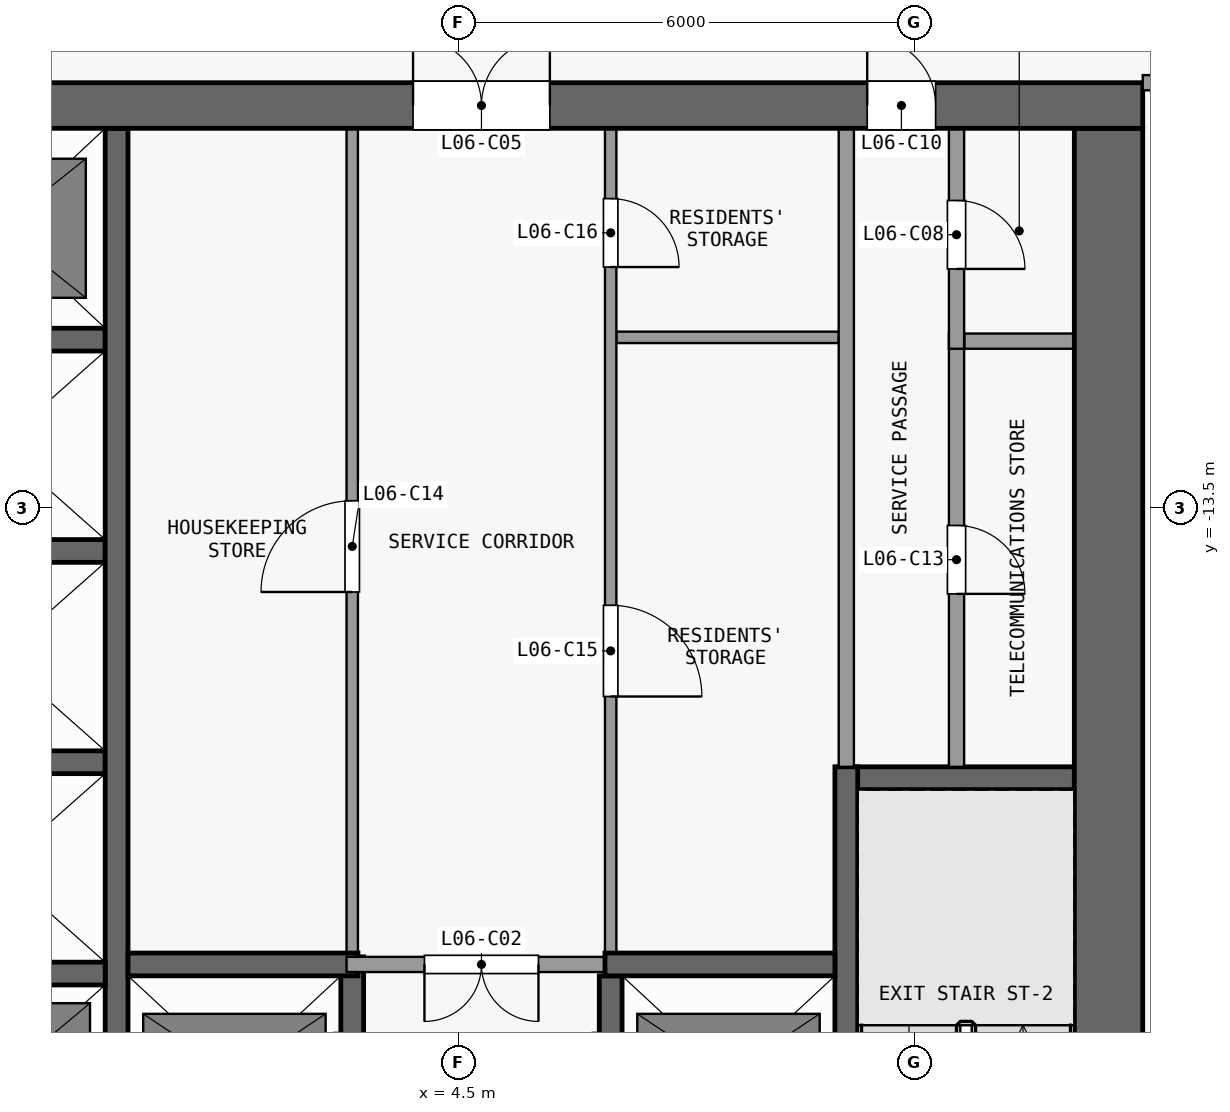
"""IFC4 building model, lengths in metres.
Left out: names, types, materials, properties, quantities, classifications, styles, units other than length and angle.
Written with IfcOpenShell. Run it as: python <this file> out.ifc"""

import sys

from ifc_helpers import new_model, si_unit, direction, frame, frame_2d, origin, place, context, subcontext, project, spatial, rectangle, extrude, element, fill, save


model = new_model("IFC4")
c1 = context("Model", 3, precision=1e-05, world=origin(), true_north=direction((0.0, 1.0)))
c2 = subcontext(c1, "Body", "Model", "MODEL_VIEW")
j1 = project(units=[si_unit("LENGTHUNIT", "METRE"), si_unit("PLANEANGLEUNIT", "RADIAN")], contexts=[c1])
p1 = place(None, origin())
s1 = spatial("IfcSite", under=j1, at=p1, CompositionType="ELEMENT")
p2 = place(p1, origin())
s2 = spatial("IfcBuilding", under=s1, at=p2, CompositionType="ELEMENT")
p3 = place(p2, frame((0.0, 0.0, 32.5)))
s3 = spatial("IfcBuildingStorey", under=s2, at=p3, CompositionType="ELEMENT", Elevation=32.5)
p4 = place(p3, frame((-13.5, -8.2, 0.0), z_axis=(0.0, 0.0, 1.0), x_axis=(1.0, 0.0, 0.0)))
e1 = element("IfcWall", 1, at=p4, inside=s3, PredefinedType="SHEAR", context=c2, shape_type="SweptSolid", body=[
    extrude(rectangle(XDim=27.0, YDim=0.6, at=frame_2d((13.5, 0.0))), origin(), (0.0, 0.0, 1.0), 3.3),
])
p5 = place(p4, frame((7.8, 0.0, 0.0)))
e2 = element("IfcOpeningElement", 2, at=p5, cuts=e1, PredefinedType="OPENING", context=c2, shape_type="SweptSolid", body=[
    extrude(rectangle(XDim=1.8, YDim=2.1, at=frame_2d((0.9, 1.05))), frame((0.0, 0.31, 0.0), z_axis=(0.0, -1.0, 0.0), x_axis=(1.0, 0.0, 0.0)), (0.0, 0.0, 1.0), 0.62),
])
p6 = place(p4, frame((17.4, 0.0, 0.0)))
e3 = element("IfcOpeningElement", 3, at=p6, cuts=e1, PredefinedType="OPENING", context=c2, shape_type="SweptSolid", body=[
    extrude(rectangle(XDim=1.8, YDim=2.1, at=frame_2d((0.9, 1.05))), frame((0.0, 0.31, 0.0), z_axis=(0.0, -1.0, 0.0), x_axis=(1.0, 0.0, 0.0)), (0.0, 0.0, 1.0), 0.62),
])
p7 = place(p4, frame((2.725, 0.0, 0.0)))
e4 = element("IfcOpeningElement", 4, at=p7, cuts=e1, PredefinedType="OPENING", context=c2, shape_type="SweptSolid", body=[
    extrude(rectangle(XDim=0.9, YDim=2.1, at=frame_2d((0.45, 1.05))), frame((0.0, 0.31, 0.0), z_axis=(0.0, -1.0, 0.0), x_axis=(1.0, 0.0, 0.0)), (0.0, 0.0, 1.0), 0.62),
])
p8 = place(p4, frame((23.375, 0.0, 0.0)))
e5 = element("IfcOpeningElement", 5, at=p8, cuts=e1, PredefinedType="OPENING", context=c2, shape_type="SweptSolid", body=[
    extrude(rectangle(XDim=0.9, YDim=2.1, at=frame_2d((0.45, 1.05))), frame((0.0, 0.31, 0.0), z_axis=(0.0, -1.0, 0.0), x_axis=(1.0, 0.0, 0.0)), (0.0, 0.0, 1.0), 0.62),
])
p9 = place(p3, frame((13.05, -24.6, 0.0), z_axis=(0.0, 0.0, 1.0), x_axis=(0.0, 1.0, 0.0)))
e6 = element("IfcWall", 6, at=p9, inside=s3, PredefinedType="SHEAR", context=c2, shape_type="SweptSolid", body=[
    extrude(rectangle(XDim=16.1, YDim=0.9, at=frame_2d((8.05, 0.0))), origin(), (0.0, 0.0, 1.0), 3.3),
])
p10 = place(p3, frame((-2.95, -19.62, 0.0), z_axis=(0.0, 0.0, 1.0), x_axis=(1.0, 0.0, 0.0)))
e7 = element("IfcWall", 7, at=p10, inside=s3, PredefinedType="SHEAR", context=c2, shape_type="SweptSolid", body=[
    extrude(rectangle(XDim=2.8, YDim=0.3, at=frame_2d((1.4, 0.0))), origin(), (0.0, 0.0, 1.0), 3.3),
])
p11 = place(p3, frame((0.15, -19.5, 0.0), z_axis=(0.0, 0.0, 1.0), x_axis=(1.0, 0.0, 0.0)))
e8 = element("IfcWall", 8, at=p11, inside=s3, PredefinedType="SHEAR", context=c2, shape_type="SweptSolid", body=[
    extrude(rectangle(XDim=3.025, YDim=0.3, at=frame_2d((1.513, 0.0))), origin(), (0.0, 0.0, 1.0), 3.3),
])
p12 = place(p3, frame((6.575, -19.5, 0.0), z_axis=(0.0, 0.0, 1.0), x_axis=(-1.0, 0.0, 0.0)))
e9 = element("IfcWall", 9, at=p12, inside=s3, PredefinedType="PARTITIONING", context=c2, shape_type="SweptSolid", body=[
    extrude(rectangle(XDim=3.55, YDim=0.2, at=frame_2d((1.775, 0.0))), origin(), (0.0, 0.0, 1.0), 3.3),
])
p13 = place(p12, frame((1.025, 0.0, 0.0)))
e10 = element("IfcOpeningElement", 10, at=p13, cuts=e9, PredefinedType="OPENING", context=c2, shape_type="SweptSolid", body=[
    extrude(rectangle(XDim=1.5, YDim=2.1, at=frame_2d((0.75, 1.05))), frame((0.0, 0.11, 0.0), z_axis=(0.0, -1.0, 0.0), x_axis=(1.0, 0.0, 0.0)), (0.0, 0.0, 1.0), 0.22),
])
p14 = place(p3, frame((6.425, -19.5, 0.0), z_axis=(0.0, 0.0, 1.0), x_axis=(1.0, 0.0, 0.0)))
e11 = element("IfcWall", 11, at=p14, inside=s3, PredefinedType="SHEAR", context=c2, shape_type="SweptSolid", body=[
    extrude(rectangle(XDim=3.025, YDim=0.3, at=frame_2d((1.512, 0.0))), origin(), (0.0, 0.0, 1.0), 3.3),
])
p15 = place(p3, frame((9.5, -17.05, 0.0), z_axis=(0.0, 0.0, 1.0), x_axis=(1.0, 0.0, 0.0)))
e12 = element("IfcWall", 12, at=p15, inside=s3, PredefinedType="SHEAR", context=c2, shape_type="SweptSolid", body=[
    extrude(rectangle(XDim=3.1, YDim=0.3, at=frame_2d((1.55, 0.0))), origin(), (0.0, 0.0, 1.0), 3.3),
])
for number, where, z_axis, x_axis in (
    (13, (-2.95, -16.84, 0.0), (0.0, 0.0, 1.0), (1.0, 0.0, 0.0)),
    (14, (-2.95, -14.06, 0.0), (0.0, 0.0, 1.0), (1.0, 0.0, 0.0)),
):
    element("IfcWall", number, at=place(p3, frame(where, z_axis=z_axis, x_axis=x_axis)), inside=s3, PredefinedType="SHEAR", context=c2, shape_type="SweptSolid", body=[
        extrude(rectangle(XDim=2.8, YDim=0.3, at=frame_2d((1.4, 0.0))), origin(), (0.0, 0.0, 1.0), 3.3),
    ])
p16 = place(p3, frame((11.15, -11.3, 0.0), z_axis=(0.0, 0.0, 1.0), x_axis=(1.0, 0.0, 0.0)))
e15 = element("IfcWall", 15, at=p16, inside=s3, PredefinedType="PARTITIONING", context=c2, shape_type="SweptSolid", body=[
    extrude(rectangle(XDim=1.45, YDim=0.2, at=frame_2d((0.725, 0.0))), origin(), (0.0, 0.0, 1.0), 3.3),
])
p17 = place(p3, frame((-2.95, -11.28, 0.0), z_axis=(0.0, 0.0, 1.0), x_axis=(1.0, 0.0, 0.0)))
e16 = element("IfcWall", 16, at=p17, inside=s3, PredefinedType="SHEAR", context=c2, shape_type="SweptSolid", body=[
    extrude(rectangle(XDim=2.8, YDim=0.3, at=frame_2d((1.4, 0.0))), origin(), (0.0, 0.0, 1.0), 3.3),
])
p18 = place(p3, frame((6.575, -11.25, 0.0), z_axis=(0.0, 0.0, 1.0), x_axis=(1.0, 0.0, 0.0)))
e17 = element("IfcWall", 17, at=p18, inside=s3, PredefinedType="PARTITIONING", context=c2, shape_type="SweptSolid", body=[
    extrude(rectangle(XDim=2.925, YDim=0.15, at=frame_2d((1.462, 0.0))), origin(), (0.0, 0.0, 1.0), 3.3),
])
p19 = place(p3, frame((0.0, -22.25, 0.0), z_axis=(0.0, 0.0, 1.0), x_axis=(0.0, 1.0, 0.0)))
e18 = element("IfcWall", 18, at=p19, inside=s3, PredefinedType="SHEAR", context=c2, shape_type="SweptSolid", body=[
    extrude(rectangle(XDim=13.75, YDim=0.3, at=frame_2d((6.875, 0.0))), origin(), (0.0, 0.0, 1.0), 3.3),
])
p20 = place(p3, frame((3.1, -22.25, 0.0), z_axis=(0.0, 0.0, 1.0), x_axis=(0.0, 1.0, 0.0)))
e19 = element("IfcWall", 19, at=p20, inside=s3, PredefinedType="SHEAR", context=c2, shape_type="SweptSolid", body=[
    extrude(rectangle(XDim=2.85, YDim=0.3, at=frame_2d((1.425, 0.0))), origin(), (0.0, 0.0, 1.0), 3.3),
])
p21 = place(p20, frame((0.75, 0.0, 0.0)))
e20 = element("IfcOpeningElement", 20, at=p21, cuts=e19, PredefinedType="OPENING", context=c2, shape_type="SweptSolid", body=[
    extrude(rectangle(XDim=1.1, YDim=2.1, at=frame_2d((0.55, 1.05))), frame((0.0, 0.16, 0.0), z_axis=(0.0, -1.0, 0.0), x_axis=(1.0, 0.0, 0.0)), (0.0, 0.0, 1.0), 0.32),
])
p22 = place(p3, frame((3.1, -19.4, 0.0), z_axis=(0.0, 0.0, 1.0), x_axis=(0.0, 1.0, 0.0)))
e21 = element("IfcWall", 21, at=p22, inside=s3, PredefinedType="PARTITIONING", context=c2, shape_type="SweptSolid", body=[
    extrude(rectangle(XDim=10.9, YDim=0.15, at=frame_2d((5.45, 0.0))), origin(), (0.0, 0.0, 1.0), 3.3),
])
p23 = place(p22, frame((4.8, 0.0, 0.0)))
e22 = element("IfcOpeningElement", 22, at=p23, cuts=e21, PredefinedType="OPENING", context=c2, shape_type="SweptSolid", body=[
    extrude(rectangle(XDim=1.2, YDim=2.1, at=frame_2d((0.6, 1.05))), frame((0.0, 0.085, 0.0), z_axis=(0.0, -1.0, 0.0), x_axis=(1.0, 0.0, 0.0)), (0.0, 0.0, 1.0), 0.17),
])
p24 = place(p3, frame((6.5, -22.25, 0.0), z_axis=(0.0, 0.0, 1.0), x_axis=(0.0, 1.0, 0.0)))
e23 = element("IfcWall", 23, at=p24, inside=s3, PredefinedType="SHEAR", context=c2, shape_type="SweptSolid", body=[
    extrude(rectangle(XDim=2.6, YDim=0.3, at=frame_2d((1.3, 0.0))), origin(), (0.0, 0.0, 1.0), 3.3),
])
p25 = place(p24, frame((0.75, 0.0, 0.0)))
e24 = element("IfcOpeningElement", 24, at=p25, cuts=e23, PredefinedType="OPENING", context=c2, shape_type="SweptSolid", body=[
    extrude(rectangle(XDim=1.1, YDim=2.1, at=frame_2d((0.55, 1.05))), frame((0.0, 0.16, 0.0), z_axis=(0.0, -1.0, 0.0), x_axis=(1.0, 0.0, 0.0)), (0.0, 0.0, 1.0), 0.32),
])
p26 = place(p3, frame((6.5, -8.5, 0.0), z_axis=(0.0, 0.0, 1.0), x_axis=(0.0, -1.0, 0.0)))
e25 = element("IfcWall", 25, at=p26, inside=s3, PredefinedType="PARTITIONING", context=c2, shape_type="SweptSolid", body=[
    extrude(rectangle(XDim=10.85, YDim=0.15, at=frame_2d((5.425, 0.0))), origin(), (0.0, 0.0, 1.0), 3.3),
])
p27 = place(p26, frame((6.275, 0.0, 0.0)))
e26 = element("IfcOpeningElement", 26, at=p27, cuts=e25, PredefinedType="OPENING", context=c2, shape_type="SweptSolid", body=[
    extrude(rectangle(XDim=1.2, YDim=2.1, at=frame_2d((0.6, 1.05))), frame((0.0, 0.085, 0.0), z_axis=(0.0, -1.0, 0.0), x_axis=(1.0, 0.0, 0.0)), (0.0, 0.0, 1.0), 0.17),
])
p28 = place(p26, frame((0.925, 0.0, 0.0)))
e27 = element("IfcOpeningElement", 27, at=p28, cuts=e25, PredefinedType="OPENING", context=c2, shape_type="SweptSolid", body=[
    extrude(rectangle(XDim=0.9, YDim=2.1, at=frame_2d((0.45, 1.05))), frame((0.0, 0.085, 0.0), z_axis=(0.0, -1.0, 0.0), x_axis=(1.0, 0.0, 0.0)), (0.0, 0.0, 1.0), 0.17),
])
p29 = place(p3, frame((9.6, -16.9, 0.0), z_axis=(0.0, 0.0, 1.0), x_axis=(0.0, -1.0, 0.0)))
e28 = element("IfcWall", 28, at=p29, inside=s3, PredefinedType="SHEAR", context=c2, shape_type="SweptSolid", body=[
    extrude(rectangle(XDim=7.7, YDim=0.3, at=frame_2d((3.85, 0.0))), origin(), (0.0, 0.0, 1.0), 3.3),
])
p30 = place(p29, frame((6.5, 0.0, 0.0)))
e29 = element("IfcOpeningElement", 29, at=p30, cuts=e28, PredefinedType="OPENING", context=c2, shape_type="SweptSolid", body=[
    extrude(rectangle(XDim=1.1, YDim=2.1, at=frame_2d((0.55, 1.05))), frame((0.0, 0.16, 0.0), z_axis=(0.0, -1.0, 0.0), x_axis=(1.0, 0.0, 0.0)), (0.0, 0.0, 1.0), 0.32),
])
p31 = place(p3, frame((9.6, -16.9, 0.0), z_axis=(0.0, 0.0, 1.0), x_axis=(0.0, 1.0, 0.0)))
e30 = element("IfcWall", 30, at=p31, inside=s3, PredefinedType="PARTITIONING", context=c2, shape_type="SweptSolid", body=[
    extrude(rectangle(XDim=8.4, YDim=0.2, at=frame_2d((4.2, 0.0))), origin(), (0.0, 0.0, 1.0), 3.3),
])
p32 = place(p3, frame((11.05, -11.2, 0.0), z_axis=(0.0, 0.0, 1.0), x_axis=(0.0, -1.0, 0.0)))
e31 = element("IfcWall", 31, at=p32, inside=s3, PredefinedType="PARTITIONING", context=c2, shape_type="SweptSolid", body=[
    extrude(rectangle(XDim=5.7, YDim=0.2, at=frame_2d((2.85, 0.0))), origin(), (0.0, 0.0, 1.0), 3.3),
])
p33 = place(p32, frame((2.525, 0.0, 0.0)))
e32 = element("IfcOpeningElement", 32, at=p33, cuts=e31, PredefinedType="OPENING", context=c2, shape_type="SweptSolid", body=[
    extrude(rectangle(XDim=0.9, YDim=2.1, at=frame_2d((0.45, 1.05))), frame((0.0, 0.11, 0.0), z_axis=(0.0, -1.0, 0.0), x_axis=(1.0, 0.0, 0.0)), (0.0, 0.0, 1.0), 0.22),
])
p34 = place(p3, frame((11.05, -8.5, 0.0), z_axis=(0.0, 0.0, 1.0), x_axis=(0.0, -1.0, 0.0)))
e33 = element("IfcWall", 33, at=p34, inside=s3, PredefinedType="PARTITIONING", context=c2, shape_type="SweptSolid", body=[
    extrude(rectangle(XDim=2.9, YDim=0.2, at=frame_2d((1.45, 0.0))), origin(), (0.0, 0.0, 1.0), 3.3),
])
p35 = place(p34, frame((0.95, 0.0, 0.0)))
e34 = element("IfcOpeningElement", 34, at=p35, cuts=e33, PredefinedType="OPENING", context=c2, shape_type="SweptSolid", body=[
    extrude(rectangle(XDim=0.9, YDim=2.1, at=frame_2d((0.45, 1.05))), frame((0.0, 0.11, 0.0), z_axis=(0.0, -1.0, 0.0), x_axis=(1.0, 0.0, 0.0)), (0.0, 0.0, 1.0), 0.22),
])
p36 = place(p3, frame((13.5, -7.9, 0.0), z_axis=(0.0, 0.0, 1.0), x_axis=(1.0, 0.0, 0.0)))
e35 = element("IfcWall", 35, at=p36, inside=s3, PredefinedType="PARTITIONING", context=c2, shape_type="SweptSolid", body=[
    extrude(rectangle(XDim=11.75, YDim=0.2, at=frame_2d((5.875, 0.0))), origin(), (0.0, 0.0, 1.0), 3.3),
])
p37 = place(p36, frame((1.0, 0.0, 0.0)))
e36 = element("IfcOpeningElement", 36, at=p37, cuts=e35, PredefinedType="OPENING", context=c2, shape_type="SweptSolid", body=[
    extrude(rectangle(XDim=1.0, YDim=2.1, at=frame_2d((0.5, 1.05))), frame((0.0, 0.11, 0.0), z_axis=(0.0, -1.0, 0.0), x_axis=(1.0, 0.0, 0.0)), (0.0, 0.0, 1.0), 0.22),
])
p38 = place(p13, origin())
e37 = element("IfcDoor", 37, at=p38, inside=s3, OperationType="DOUBLE_DOOR_SINGLE_SWING", PredefinedType="DOOR", context=c2, shape_type="SweptSolid", body=[
    extrude(rectangle(XDim=1.5, YDim=2.1, at=frame_2d((0.75, 1.05))), frame((0.0, 0.025, 0.0), z_axis=(0.0, -1.0, 0.0), x_axis=(1.0, 0.0, 0.0)), (0.0, 0.0, 1.0), 0.05),
])
fill(e10, e37)
p39 = place(p6, origin())
e38 = element("IfcDoor", 38, at=p39, inside=s3, OperationType="DOUBLE_DOOR_SINGLE_SWING", PredefinedType="DOOR", context=c2, shape_type="SweptSolid", body=[
    extrude(rectangle(XDim=1.8, YDim=2.1, at=frame_2d((0.9, 1.05))), frame((0.0, 0.025, 0.0), z_axis=(0.0, -1.0, 0.0), x_axis=(1.0, 0.0, 0.0)), (0.0, 0.0, 1.0), 0.05),
])
fill(e3, e38)
p40 = place(p35, origin())
e39 = element("IfcDoor", 39, at=p40, inside=s3, OperationType="SINGLE_SWING_RIGHT", PredefinedType="DOOR", context=c2, shape_type="SweptSolid", body=[
    extrude(rectangle(XDim=0.9, YDim=2.1, at=frame_2d((0.45, 1.05))), frame((0.0, 0.025, 0.0), z_axis=(0.0, -1.0, 0.0), x_axis=(1.0, 0.0, 0.0)), (0.0, 0.0, 1.0), 0.05),
])
fill(e34, e39)
p41 = place(p8, origin())
e40 = element("IfcDoor", 40, at=p41, inside=s3, OperationType="SINGLE_SWING_LEFT", PredefinedType="DOOR", context=c2, shape_type="SweptSolid", body=[
    extrude(rectangle(XDim=0.9, YDim=2.1, at=frame_2d((0.45, 1.05))), frame((0.0, 0.025, 0.0), z_axis=(0.0, -1.0, 0.0), x_axis=(1.0, 0.0, 0.0)), (0.0, 0.0, 1.0), 0.05),
])
fill(e5, e40)
p42 = place(p33, origin())
e41 = element("IfcDoor", 41, at=p42, inside=s3, OperationType="SINGLE_SWING_RIGHT", PredefinedType="DOOR", context=c2, shape_type="SweptSolid", body=[
    extrude(rectangle(XDim=0.9, YDim=2.1, at=frame_2d((0.45, 1.05))), frame((0.0, 0.025, 0.0), z_axis=(0.0, -1.0, 0.0), x_axis=(1.0, 0.0, 0.0)), (0.0, 0.0, 1.0), 0.05),
])
fill(e32, e41)
p43 = place(p23, origin())
e42 = element("IfcDoor", 42, at=p43, inside=s3, OperationType="SINGLE_SWING_LEFT", PredefinedType="DOOR", context=c2, shape_type="SweptSolid", body=[
    extrude(rectangle(XDim=1.2, YDim=2.1, at=frame_2d((0.6, 1.05))), frame((0.0, 0.025, 0.0), z_axis=(0.0, -1.0, 0.0), x_axis=(1.0, 0.0, 0.0)), (0.0, 0.0, 1.0), 0.05),
])
fill(e22, e42)
p44 = place(p27, origin())
e43 = element("IfcDoor", 43, at=p44, inside=s3, OperationType="SINGLE_SWING_RIGHT", PredefinedType="DOOR", context=c2, shape_type="SweptSolid", body=[
    extrude(rectangle(XDim=1.2, YDim=2.1, at=frame_2d((0.6, 1.05))), frame((0.0, 0.025, 0.0), z_axis=(0.0, -1.0, 0.0), x_axis=(1.0, 0.0, 0.0)), (0.0, 0.0, 1.0), 0.05),
])
fill(e26, e43)
p45 = place(p28, origin())
e44 = element("IfcDoor", 44, at=p45, inside=s3, OperationType="SINGLE_SWING_RIGHT", PredefinedType="DOOR", context=c2, shape_type="SweptSolid", body=[
    extrude(rectangle(XDim=0.9, YDim=2.1, at=frame_2d((0.45, 1.05))), frame((0.0, 0.025, 0.0), z_axis=(0.0, -1.0, 0.0), x_axis=(1.0, 0.0, 0.0)), (0.0, 0.0, 1.0), 0.05),
])
fill(e27, e44)
save(model, sys.argv[1])
